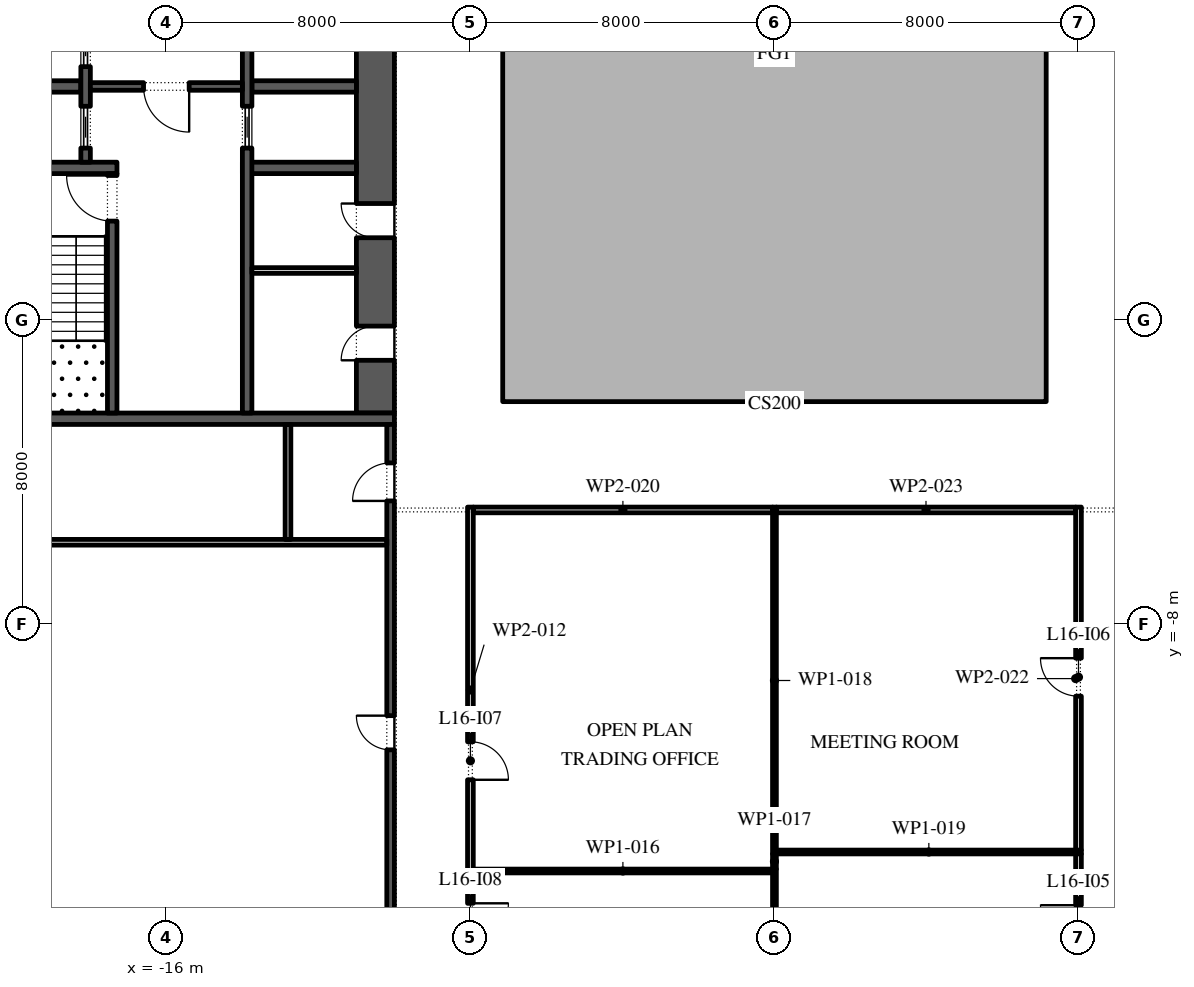
"""IFC4 building model, lengths in metres.
Left out: names, types, materials, properties, quantities, classifications, styles, units other than length and angle.
Written with IfcOpenShell. Run it as: python <this file> out.ifc"""

import sys

from ifc_helpers import new_model, si_unit, direction, frame, frame_2d, origin, place, context, subcontext, project, spatial, polyline, rectangle, outline, extrude, element, fill, save


model = new_model("IFC4")
c1 = context("Model", 3, precision=1e-05, world=origin(), true_north=direction((0.0, 1.0)))
c2 = subcontext(c1, "Body", "Model", "MODEL_VIEW")
j1 = project(units=[si_unit("LENGTHUNIT", "METRE"), si_unit("PLANEANGLEUNIT", "RADIAN")], contexts=[c1])
p1 = place(None, origin())
s1 = spatial("IfcSite", under=j1, at=p1, CompositionType="ELEMENT")
p2 = place(p1, origin())
s2 = spatial("IfcBuilding", under=s1, at=p2, CompositionType="ELEMENT")
p3 = place(p2, frame((0.0, 0.0, 77.4)))
s3 = spatial("IfcBuildingStorey", under=s2, at=p3, CompositionType="ELEMENT", Elevation=77.4)
p4 = place(p3, origin())
e1 = element("IfcWall", 1, at=p4, inside=s3, PredefinedType="STANDARD", context=c2, shape_type="SweptSolid", body=[
    extrude(outline(polyline([(-7.15, -2.15), (7.15, -2.15), (7.15, 16.15), (-7.15, 16.15), (-7.15, -2.15)]), holes=[polyline([(-7.0, -2.0), (-7.0, 16.0), (7.0, 16.0), (7.0, -2.0), (-7.0, -2.0)])]), origin(), (0.0, 0.0, 1.0), 4.0),
])
p5 = place(p3, frame((-10.5, -2.45, 0.0), z_axis=(0.0, 0.0, 1.0), x_axis=(0.0, 1.0, 0.0)))
e2 = element("IfcWall", 2, at=p5, inside=s3, PredefinedType="SHEAR", context=c2, shape_type="SweptSolid", body=[
    extrude(rectangle(XDim=27.9, YDim=1.0, at=frame_2d((13.95, 0.0))), origin(), (0.0, 0.0, 1.0), 4.0),
])
p6 = place(p5, frame((23.65, 0.0, 0.0)))
e3 = element("IfcOpeningElement", 3, at=p6, cuts=e2, PredefinedType="OPENING", context=c2, shape_type="SweptSolid", body=[
    extrude(rectangle(XDim=2.4, YDim=2.1, at=frame_2d((1.2, 1.05))), frame((0.0, 0.51, 0.0), z_axis=(0.0, -1.0, 0.0), x_axis=(1.0, 0.0, 0.0)), (0.0, 0.0, 1.0), 1.02),
])
p7 = place(p5, frame((1.387, 0.0, 0.0)))
e4 = element("IfcOpeningElement", 4, at=p7, cuts=e2, PredefinedType="OPENING", context=c2, shape_type="SweptSolid", body=[
    extrude(rectangle(XDim=0.9, YDim=2.1, at=frame_2d((0.45, 1.05))), frame((0.0, 0.51, 0.0), z_axis=(0.0, -1.0, 0.0), x_axis=(1.0, 0.0, 0.0)), (0.0, 0.0, 1.0), 1.02),
])
p8 = place(p5, frame((4.613, 0.0, 0.0)))
e5 = element("IfcOpeningElement", 5, at=p8, cuts=e2, PredefinedType="OPENING", context=c2, shape_type="SweptSolid", body=[
    extrude(rectangle(XDim=0.9, YDim=2.1, at=frame_2d((0.45, 1.05))), frame((0.0, 0.51, 0.0), z_axis=(0.0, -1.0, 0.0), x_axis=(1.0, 0.0, 0.0)), (0.0, 0.0, 1.0), 1.02),
])
p9 = place(p3, frame((-22.0, -2.6, 0.0), z_axis=(0.0, 0.0, 1.0), x_axis=(1.0, 0.0, 0.0)))
e6 = element("IfcWall", 6, at=p9, inside=s3, PredefinedType="SHEAR", context=c2, shape_type="SweptSolid", body=[
    extrude(rectangle(XDim=12.0, YDim=0.3, at=frame_2d((6.0, 0.0))), origin(), (0.0, 0.0, 1.0), 4.0),
])
p10 = place(p3, frame((-21.0, 4.0, 0.0), z_axis=(0.0, 0.0, 1.0), x_axis=(1.0, 0.0, 0.0)))
e7 = element("IfcWall", 7, at=p10, inside=s3, PredefinedType="SHEAR", context=c2, shape_type="SweptSolid", body=[
    extrude(rectangle(XDim=3.7, YDim=0.3, at=frame_2d((1.85, 0.0))), origin(), (0.0, 0.0, 1.0), 4.0),
])
p11 = place(p3, frame((-17.425, -2.45, 0.0), z_axis=(0.0, 0.0, 1.0), x_axis=(0.0, 1.0, 0.0)))
e8 = element("IfcWall", 8, at=p11, inside=s3, PredefinedType="SHEAR", context=c2, shape_type="SweptSolid", body=[
    extrude(rectangle(XDim=6.3, YDim=0.25, at=frame_2d((3.15, 0.0))), origin(), (0.0, 0.0, 1.0), 4.0),
])
p12 = place(p11, frame((5.05, 0.0, 0.0)))
e9 = element("IfcOpeningElement", 9, at=p12, cuts=e8, PredefinedType="OPENING", context=c2, shape_type="SweptSolid", body=[
    extrude(rectangle(XDim=1.2, YDim=2.1, at=frame_2d((0.6, 1.05))), frame((0.0, 0.135, 0.0), z_axis=(0.0, -1.0, 0.0), x_axis=(1.0, 0.0, 0.0)), (0.0, 0.0, 1.0), 0.27),
])
p13 = place(p3, frame((-21.0, 6.143, 0.0), z_axis=(0.0, 0.0, 1.0), x_axis=(1.0, 0.0, 0.0)))
e10 = element("IfcWall", 10, at=p13, inside=s3, PredefinedType="SHEAR", context=c2, shape_type="SweptSolid", body=[
    extrude(rectangle(XDim=2.75, YDim=0.3, at=frame_2d((1.375, 0.0))), origin(), (0.0, 0.0, 1.0), 4.0),
])
p14 = place(p3, frame((-18.125, 4.15, 0.0), z_axis=(0.0, 0.0, 1.0), x_axis=(0.0, 1.0, 0.0)))
e11 = element("IfcWall", 11, at=p14, inside=s3, PredefinedType="SHEAR", context=c2, shape_type="SweptSolid", body=[
    extrude(rectangle(XDim=14.7, YDim=0.25, at=frame_2d((7.35, 0.0))), origin(), (0.0, 0.0, 1.0), 4.0),
])
p15 = place(p14, frame((0.371, 0.0, 0.0)))
e12 = element("IfcOpeningElement", 12, at=p15, cuts=e11, PredefinedType="OPENING", context=c2, shape_type="SweptSolid", body=[
    extrude(rectangle(XDim=1.1, YDim=2.1, at=frame_2d((0.55, 1.05))), frame((0.0, 0.135, 0.0), z_axis=(0.0, -1.0, 0.0), x_axis=(1.0, 0.0, 0.0)), (0.0, 0.0, 1.0), 0.27),
])
p16 = place(p14, frame((2.514, 0.0, 0.0)))
e13 = element("IfcOpeningElement", 13, at=p16, cuts=e11, PredefinedType="OPENING", context=c2, shape_type="SweptSolid", body=[
    extrude(rectangle(XDim=1.1, YDim=2.1, at=frame_2d((0.55, 1.05))), frame((0.0, 0.135, 0.0), z_axis=(0.0, -1.0, 0.0), x_axis=(1.0, 0.0, 0.0)), (0.0, 0.0, 1.0), 0.27),
])
p17 = place(p14, frame((4.657, 0.0, 0.0)))
e14 = element("IfcOpeningElement", 14, at=p17, cuts=e11, PredefinedType="OPENING", context=c2, shape_type="SweptSolid", body=[
    extrude(rectangle(XDim=1.1, YDim=2.1, at=frame_2d((0.55, 1.05))), frame((0.0, 0.135, 0.0), z_axis=(0.0, -1.0, 0.0), x_axis=(1.0, 0.0, 0.0)), (0.0, 0.0, 1.0), 0.27),
])
p18 = place(p14, frame((6.8, 0.0, 0.0)))
e15 = element("IfcOpeningElement", 15, at=p18, cuts=e11, PredefinedType="OPENING", context=c2, shape_type="SweptSolid", body=[
    extrude(rectangle(XDim=1.1, YDim=2.1, at=frame_2d((0.55, 1.05))), frame((0.0, 0.135, 0.0), z_axis=(0.0, -1.0, 0.0), x_axis=(1.0, 0.0, 0.0)), (0.0, 0.0, 1.0), 0.27),
])
p19 = place(p14, frame((8.943, 0.0, 0.0)))
e16 = element("IfcOpeningElement", 16, at=p19, cuts=e11, PredefinedType="OPENING", context=c2, shape_type="SweptSolid", body=[
    extrude(rectangle(XDim=1.1, YDim=2.1, at=frame_2d((0.55, 1.05))), frame((0.0, 0.135, 0.0), z_axis=(0.0, -1.0, 0.0), x_axis=(1.0, 0.0, 0.0)), (0.0, 0.0, 1.0), 0.27),
])
p20 = place(p14, frame((11.086, 0.0, 0.0)))
e17 = element("IfcOpeningElement", 17, at=p20, cuts=e11, PredefinedType="OPENING", context=c2, shape_type="SweptSolid", body=[
    extrude(rectangle(XDim=1.1, YDim=2.1, at=frame_2d((0.55, 1.05))), frame((0.0, 0.135, 0.0), z_axis=(0.0, -1.0, 0.0), x_axis=(1.0, 0.0, 0.0)), (0.0, 0.0, 1.0), 0.27),
])
p21 = place(p14, frame((13.229, 0.0, 0.0)))
e18 = element("IfcOpeningElement", 18, at=p21, cuts=e11, PredefinedType="OPENING", context=c2, shape_type="SweptSolid", body=[
    extrude(rectangle(XDim=1.1, YDim=2.1, at=frame_2d((0.55, 1.05))), frame((0.0, 0.135, 0.0), z_axis=(0.0, -1.0, 0.0), x_axis=(1.0, 0.0, 0.0)), (0.0, 0.0, 1.0), 0.27),
])
p22 = place(p3, frame((-14.0, 4.0, 0.0), z_axis=(0.0, 0.0, 1.0), x_axis=(1.0, 0.0, 0.0)))
e19 = element("IfcWall", 19, at=p22, inside=s3, PredefinedType="SHEAR", context=c2, shape_type="SweptSolid", body=[
    extrude(rectangle(XDim=3.0, YDim=0.3, at=frame_2d((1.5, 0.0))), origin(), (0.0, 0.0, 1.0), 4.0),
])
p23 = place(p3, frame((-13.75, 6.143, 0.0), z_axis=(0.0, 0.0, 1.0), x_axis=(1.0, 0.0, 0.0)))
e20 = element("IfcWall", 20, at=p23, inside=s3, PredefinedType="SHEAR", context=c2, shape_type="SweptSolid", body=[
    extrude(rectangle(XDim=2.75, YDim=0.3, at=frame_2d((1.375, 0.0))), origin(), (0.0, 0.0, 1.0), 4.0),
])
p24 = place(p3, frame((-13.875, -2.45, 0.0), z_axis=(0.0, 0.0, 1.0), x_axis=(0.0, 1.0, 0.0)))
e21 = element("IfcWall", 21, at=p24, inside=s3, PredefinedType="SHEAR", context=c2, shape_type="SweptSolid", body=[
    extrude(rectangle(XDim=21.3, YDim=0.25, at=frame_2d((10.65, 0.0))), origin(), (0.0, 0.0, 1.0), 4.0),
])
p25 = place(p24, frame((11.446, 0.0, 0.0)))
e22 = element("IfcOpeningElement", 22, at=p25, cuts=e21, PredefinedType="OPENING", context=c2, shape_type="SweptSolid", body=[
    extrude(rectangle(XDim=0.9, YDim=2.1, at=frame_2d((0.45, 1.05))), frame((0.0, 0.135, 0.0), z_axis=(0.0, -1.0, 0.0), x_axis=(1.0, 0.0, 0.0)), (0.0, 0.0, 1.0), 0.27),
])
p26 = place(p24, frame((17.725, 0.0, 0.0)))
e23 = element("IfcOpeningElement", 23, at=p26, cuts=e21, PredefinedType="OPENING", context=c2, shape_type="SweptSolid", body=[
    extrude(rectangle(XDim=0.9, YDim=2.1, at=frame_2d((0.45, 1.05))), frame((0.0, 0.135, 0.0), z_axis=(0.0, -1.0, 0.0), x_axis=(1.0, 0.0, 0.0)), (0.0, 0.0, 1.0), 0.27),
])
p27 = place(p24, frame((6.971, 0.0, 0.0)))
e24 = element("IfcOpeningElement", 24, at=p27, cuts=e21, PredefinedType="OPENING", context=c2, shape_type="SweptSolid", body=[
    extrude(rectangle(XDim=1.1, YDim=2.1, at=frame_2d((0.55, 1.05))), frame((0.0, 0.135, 0.0), z_axis=(0.0, -1.0, 0.0), x_axis=(1.0, 0.0, 0.0)), (0.0, 0.0, 1.0), 0.27),
])
p28 = place(p3, frame((-18.0, 6.143, 0.0), z_axis=(0.0, 0.0, 1.0), x_axis=(1.0, 0.0, 0.0)))
e25 = element("IfcWall", 25, at=p28, inside=s3, PredefinedType="SHEAR", context=c2, shape_type="SweptSolid", body=[
    extrude(rectangle(XDim=4.0, YDim=0.2, at=frame_2d((2.0, 0.0))), origin(), (0.0, 0.0, 1.0), 4.0),
])
p29 = place(p28, frame((1.4, 0.0, 0.0)))
e26 = element("IfcOpeningElement", 26, at=p29, cuts=e25, PredefinedType="OPENING", context=c2, shape_type="SweptSolid", body=[
    extrude(rectangle(XDim=1.2, YDim=2.1, at=frame_2d((0.6, 1.05))), frame((0.0, 0.11, 0.0), z_axis=(0.0, -1.0, 0.0), x_axis=(1.0, 0.0, 0.0)), (0.0, 0.0, 1.0), 0.22),
])
p30 = place(p3, frame((-13.75, 1.3, 0.0), z_axis=(0.0, 0.0, 1.0), x_axis=(1.0, 0.0, 0.0)))
e27 = element("IfcWall", 27, at=p30, inside=s3, PredefinedType="PARTITIONING", context=c2, shape_type="SweptSolid", body=[
    extrude(rectangle(XDim=2.75, YDim=0.15, at=frame_2d((1.375, 0.0))), origin(), (0.0, 0.0, 1.0), 4.0),
])
p31 = place(p3, frame((-10.1, -15.8, 0.0), z_axis=(0.0, 0.0, 1.0), x_axis=(0.0, 1.0, 0.0)))
e28 = element("IfcWall", 28, at=p31, inside=s3, PredefinedType="SHEAR", context=c2, shape_type="SweptSolid", body=[
    extrude(rectangle(XDim=13.05, YDim=0.2, at=frame_2d((6.525, 0.0))), origin(), (0.0, 0.0, 1.0), 4.0),
])
p32 = place(p31, frame((4.488, 0.0, 0.0)))
e29 = element("IfcOpeningElement", 29, at=p32, cuts=e28, PredefinedType="OPENING", context=c2, shape_type="SweptSolid", body=[
    extrude(rectangle(XDim=0.9, YDim=2.1, at=frame_2d((0.45, 1.05))), frame((0.0, 0.11, 0.0), z_axis=(0.0, -1.0, 0.0), x_axis=(1.0, 0.0, 0.0)), (0.0, 0.0, 1.0), 0.22),
])
p33 = place(p31, frame((11.038, 0.0, 0.0)))
e30 = element("IfcOpeningElement", 30, at=p33, cuts=e28, PredefinedType="OPENING", context=c2, shape_type="SweptSolid", body=[
    extrude(rectangle(XDim=1.0, YDim=2.1, at=frame_2d((0.5, 1.05))), frame((0.0, 0.11, 0.0), z_axis=(0.0, -1.0, 0.0), x_axis=(1.0, 0.0, 0.0)), (0.0, 0.0, 1.0), 0.22),
])
p34 = place(p3, frame((-21.8, -5.85, 0.0), z_axis=(0.0, 0.0, 1.0), x_axis=(1.0, 0.0, 0.0)))
e31 = element("IfcWall", 31, at=p34, inside=s3, PredefinedType="PARTITIONING", context=c2, shape_type="SweptSolid", body=[
    extrude(rectangle(XDim=11.6, YDim=0.15, at=frame_2d((5.8, 0.0))), origin(), (0.0, 0.0, 1.0), 4.0),
])
p35 = place(p3, frame((-12.8, -5.775, 0.0), z_axis=(0.0, 0.0, 1.0), x_axis=(0.0, 1.0, 0.0)))
e32 = element("IfcWall", 32, at=p35, inside=s3, PredefinedType="PARTITIONING", context=c2, shape_type="SweptSolid", body=[
    extrude(rectangle(XDim=3.025, YDim=0.15, at=frame_2d((1.512, 0.0))), origin(), (0.0, 0.0, 1.0), 4.0),
])
p36 = place(p3, frame((-8.0, -14.55, 0.0), z_axis=(0.0, 0.0, 1.0), x_axis=(0.0, -1.0, 0.0)))
e33 = element("IfcWall", 33, at=p36, inside=s3, PredefinedType="PARTITIONING", context=c2, shape_type="SweptSolid", body=[
    extrude(rectangle(XDim=3.375, YDim=0.15, at=frame_2d((1.688, 0.0))), origin(), (0.0, 0.0, 1.0), 4.0),
])
p37 = place(p36, frame((0.8, 0.0, 0.0)))
e34 = element("IfcOpeningElement", 34, at=p37, cuts=e33, PredefinedType="OPENING", context=c2, shape_type="SweptSolid", body=[
    extrude(rectangle(XDim=1.0, YDim=2.1, at=frame_2d((0.5, 1.05))), frame((0.0, 0.085, 0.0), z_axis=(0.0, -1.0, 0.0), x_axis=(1.0, 0.0, 0.0)), (0.0, 0.0, 1.0), 0.17),
])
p38 = place(p3, frame((-8.0, -4.925, 0.0), z_axis=(0.0, 0.0, 1.0), x_axis=(0.0, -1.0, 0.0)))
e35 = element("IfcWall", 35, at=p38, inside=s3, PredefinedType="PARTITIONING", context=c2, shape_type="SweptSolid", body=[
    extrude(rectangle(XDim=9.625, YDim=0.15, at=frame_2d((4.812, 0.0))), origin(), (0.0, 0.0, 1.0), 4.0),
])
p39 = place(p38, frame((6.175, 0.0, 0.0)))
e36 = element("IfcOpeningElement", 36, at=p39, cuts=e35, PredefinedType="OPENING", context=c2, shape_type="SweptSolid", body=[
    extrude(rectangle(XDim=1.0, YDim=2.1, at=frame_2d((0.5, 1.05))), frame((0.0, 0.085, 0.0), z_axis=(0.0, -1.0, 0.0), x_axis=(1.0, 0.0, 0.0)), (0.0, 0.0, 1.0), 0.17),
])
p40 = place(p3, frame((0.0, -27.8, 0.0), z_axis=(0.0, 0.0, 1.0), x_axis=(0.0, 1.0, 0.0)))
e37 = element("IfcWall", 37, at=p40, inside=s3, PredefinedType="PARTITIONING", context=c2, shape_type="SweptSolid", body=[
    extrude(rectangle(XDim=13.35, YDim=0.1, at=frame_2d((6.675, 0.0))), origin(), (0.0, 0.0, 1.0), 4.0),
])
p41 = place(p3, frame((-0.05, -14.5, 0.0), z_axis=(0.0, 0.0, 1.0), x_axis=(-1.0, 0.0, 0.0)))
e38 = element("IfcWall", 38, at=p41, inside=s3, PredefinedType="PARTITIONING", context=c2, shape_type="SweptSolid", body=[
    extrude(rectangle(XDim=7.875, YDim=0.1, at=frame_2d((3.938, 0.0))), origin(), (0.0, 0.0, 1.0), 4.0),
])
p42 = place(p3, frame((0.0, -14.45, 0.0), z_axis=(0.0, 0.0, 1.0), x_axis=(0.0, 1.0, 0.0)))
e39 = element("IfcWall", 39, at=p42, inside=s3, PredefinedType="PARTITIONING", context=c2, shape_type="SweptSolid", body=[
    extrude(rectangle(XDim=0.4, YDim=0.1, at=frame_2d((0.2, 0.0))), origin(), (0.0, 0.0, 1.0), 4.0),
])
p43 = place(p3, frame((0.0, -14.05, 0.0), z_axis=(0.0, 0.0, 1.0), x_axis=(0.0, 1.0, 0.0)))
e40 = element("IfcWall", 40, at=p43, inside=s3, PredefinedType="PARTITIONING", context=c2, shape_type="SweptSolid", body=[
    extrude(rectangle(XDim=9.125, YDim=0.1, at=frame_2d((4.562, 0.0))), origin(), (0.0, 0.0, 1.0), 4.0),
])
p44 = place(p3, frame((0.05, -14.0, 0.0), z_axis=(0.0, 0.0, 1.0), x_axis=(1.0, 0.0, 0.0)))
e41 = element("IfcWall", 41, at=p44, inside=s3, PredefinedType="PARTITIONING", context=c2, shape_type="SweptSolid", body=[
    extrude(rectangle(XDim=8.025, YDim=0.1, at=frame_2d((4.012, 0.0))), origin(), (0.0, 0.0, 1.0), 4.0),
])
p45 = place(p3, frame((-0.05, -5.0, 0.0), z_axis=(0.0, 0.0, 1.0), x_axis=(-1.0, 0.0, 0.0)))
e42 = element("IfcWall", 42, at=p45, inside=s3, PredefinedType="PARTITIONING", context=c2, shape_type="SweptSolid", body=[
    extrude(rectangle(XDim=7.875, YDim=0.15, at=frame_2d((3.938, 0.0))), origin(), (0.0, 0.0, 1.0), 4.0),
])
p46 = place(p3, frame((8.0, -18.075, 0.0), z_axis=(0.0, 0.0, 1.0), x_axis=(0.0, 1.0, 0.0)))
e43 = element("IfcWall", 43, at=p46, inside=s3, PredefinedType="PARTITIONING", context=c2, shape_type="SweptSolid", body=[
    extrude(rectangle(XDim=4.025, YDim=0.15, at=frame_2d((2.012, 0.0))), origin(), (0.0, 0.0, 1.0), 4.0),
])
p47 = place(p46, frame((1.675, 0.0, 0.0)))
e44 = element("IfcOpeningElement", 44, at=p47, cuts=e43, PredefinedType="OPENING", context=c2, shape_type="SweptSolid", body=[
    extrude(rectangle(XDim=1.0, YDim=2.1, at=frame_2d((0.5, 1.05))), frame((0.0, 0.085, 0.0), z_axis=(0.0, -1.0, 0.0), x_axis=(1.0, 0.0, 0.0)), (0.0, 0.0, 1.0), 0.17),
])
p48 = place(p3, frame((8.0, -13.95, 0.0), z_axis=(0.0, 0.0, 1.0), x_axis=(0.0, 1.0, 0.0)))
e45 = element("IfcWall", 45, at=p48, inside=s3, PredefinedType="PARTITIONING", context=c2, shape_type="SweptSolid", body=[
    extrude(rectangle(XDim=9.025, YDim=0.15, at=frame_2d((4.512, 0.0))), origin(), (0.0, 0.0, 1.0), 4.0),
])
p49 = place(p48, frame((4.05, 0.0, 0.0)))
e46 = element("IfcOpeningElement", 46, at=p49, cuts=e45, PredefinedType="OPENING", context=c2, shape_type="SweptSolid", body=[
    extrude(rectangle(XDim=1.0, YDim=2.1, at=frame_2d((0.5, 1.05))), frame((0.0, 0.085, 0.0), z_axis=(0.0, -1.0, 0.0), x_axis=(1.0, 0.0, 0.0)), (0.0, 0.0, 1.0), 0.17),
])
p50 = place(p3, frame((7.925, -5.0, 0.0), z_axis=(0.0, 0.0, 1.0), x_axis=(-1.0, 0.0, 0.0)))
e47 = element("IfcWall", 47, at=p50, inside=s3, PredefinedType="PARTITIONING", context=c2, shape_type="SweptSolid", body=[
    extrude(rectangle(XDim=7.875, YDim=0.15, at=frame_2d((3.938, 0.0))), origin(), (0.0, 0.0, 1.0), 4.0),
])
p51 = place(p15, origin())
e48 = element("IfcDoor", 48, at=p51, inside=s3, OperationType="SLIDING_TO_LEFT", PredefinedType="DOOR", context=c2, shape_type="SweptSolid", body=[
    extrude(rectangle(XDim=1.1, YDim=2.1, at=frame_2d((0.55, 1.05))), frame((0.0, 0.025, 0.0), z_axis=(0.0, -1.0, 0.0), x_axis=(1.0, 0.0, 0.0)), (0.0, 0.0, 1.0), 0.05),
])
fill(e12, e48)
p52 = place(p16, origin())
e49 = element("IfcDoor", 49, at=p52, inside=s3, OperationType="SLIDING_TO_LEFT", PredefinedType="DOOR", context=c2, shape_type="SweptSolid", body=[
    extrude(rectangle(XDim=1.1, YDim=2.1, at=frame_2d((0.55, 1.05))), frame((0.0, 0.025, 0.0), z_axis=(0.0, -1.0, 0.0), x_axis=(1.0, 0.0, 0.0)), (0.0, 0.0, 1.0), 0.05),
])
fill(e13, e49)
p53 = place(p27, origin())
e50 = element("IfcDoor", 50, at=p53, inside=s3, OperationType="SLIDING_TO_LEFT", PredefinedType="DOOR", context=c2, shape_type="SweptSolid", body=[
    extrude(rectangle(XDim=1.1, YDim=2.1, at=frame_2d((0.55, 1.05))), frame((0.0, 0.025, 0.0), z_axis=(0.0, -1.0, 0.0), x_axis=(1.0, 0.0, 0.0)), (0.0, 0.0, 1.0), 0.05),
])
fill(e24, e50)
p54 = place(p29, frame((1.2, 0.0, 0.0), z_axis=(0.0, 0.0, 1.0), x_axis=(-1.0, 0.0, 0.0)))
e51 = element("IfcDoor", 51, at=p54, inside=s3, OperationType="SINGLE_SWING_RIGHT", PredefinedType="DOOR", context=c2, shape_type="SweptSolid", body=[
    extrude(rectangle(XDim=1.2, YDim=2.1, at=frame_2d((0.6, 1.05))), frame((0.0, 0.025, 0.0), z_axis=(0.0, -1.0, 0.0), x_axis=(1.0, 0.0, 0.0)), (0.0, 0.0, 1.0), 0.05),
])
fill(e26, e51)
p55 = place(p12, origin())
e52 = element("IfcDoor", 52, at=p55, inside=s3, OperationType="SINGLE_SWING_LEFT", PredefinedType="DOOR", context=c2, shape_type="SweptSolid", body=[
    extrude(rectangle(XDim=1.2, YDim=2.1, at=frame_2d((0.6, 1.05))), frame((0.0, 0.025, 0.0), z_axis=(0.0, -1.0, 0.0), x_axis=(1.0, 0.0, 0.0)), (0.0, 0.0, 1.0), 0.05),
])
fill(e9, e52)
p56 = place(p7, origin())
e53 = element("IfcDoor", 53, at=p56, inside=s3, OperationType="SINGLE_SWING_RIGHT", PredefinedType="DOOR", context=c2, shape_type="SweptSolid", body=[
    extrude(rectangle(XDim=0.9, YDim=2.1, at=frame_2d((0.45, 1.05))), frame((0.0, 0.5, 0.0), z_axis=(0.0, -1.0, 0.0), x_axis=(1.0, 0.0, 0.0)), (0.0, 0.0, 1.0), 0.05),
])
fill(e4, e53)
p57 = place(p8, origin())
e54 = element("IfcDoor", 54, at=p57, inside=s3, OperationType="SINGLE_SWING_LEFT", PredefinedType="DOOR", context=c2, shape_type="SweptSolid", body=[
    extrude(rectangle(XDim=0.9, YDim=2.1, at=frame_2d((0.45, 1.05))), frame((0.0, 0.5, 0.0), z_axis=(0.0, -1.0, 0.0), x_axis=(1.0, 0.0, 0.0)), (0.0, 0.0, 1.0), 0.05),
])
fill(e5, e54)
p58 = place(p32, origin())
e55 = element("IfcDoor", 55, at=p58, inside=s3, OperationType="SINGLE_SWING_LEFT", PredefinedType="DOOR", context=c2, shape_type="SweptSolid", body=[
    extrude(rectangle(XDim=0.9, YDim=2.1, at=frame_2d((0.45, 1.05))), frame((0.0, 0.1, 0.0), z_axis=(0.0, -1.0, 0.0), x_axis=(1.0, 0.0, 0.0)), (0.0, 0.0, 1.0), 0.05),
])
fill(e29, e55)
p59 = place(p33, origin())
e56 = element("IfcDoor", 56, at=p59, inside=s3, OperationType="SINGLE_SWING_RIGHT", PredefinedType="DOOR", context=c2, shape_type="SweptSolid", body=[
    extrude(rectangle(XDim=1.0, YDim=2.1, at=frame_2d((0.5, 1.05))), frame((0.0, 0.1, 0.0), z_axis=(0.0, -1.0, 0.0), x_axis=(1.0, 0.0, 0.0)), (0.0, 0.0, 1.0), 0.05),
])
fill(e30, e56)
p60 = place(p47, origin())
e57 = element("IfcDoor", 57, at=p60, inside=s3, OperationType="SINGLE_SWING_LEFT", PredefinedType="DOOR", context=c2, shape_type="SweptSolid", body=[
    extrude(rectangle(XDim=1.0, YDim=2.1, at=frame_2d((0.5, 1.05))), frame((0.0, 0.025, 0.0), z_axis=(0.0, -1.0, 0.0), x_axis=(1.0, 0.0, 0.0)), (0.0, 0.0, 1.0), 0.05),
])
fill(e44, e57)
p61 = place(p49, origin())
e58 = element("IfcDoor", 58, at=p61, inside=s3, OperationType="SINGLE_SWING_LEFT", PredefinedType="DOOR", context=c2, shape_type="SweptSolid", body=[
    extrude(rectangle(XDim=1.0, YDim=2.1, at=frame_2d((0.5, 1.05))), frame((0.0, 0.025, 0.0), z_axis=(0.0, -1.0, 0.0), x_axis=(1.0, 0.0, 0.0)), (0.0, 0.0, 1.0), 0.05),
])
fill(e46, e58)
p62 = place(p39, origin())
e59 = element("IfcDoor", 59, at=p62, inside=s3, OperationType="SINGLE_SWING_LEFT", PredefinedType="DOOR", context=c2, shape_type="SweptSolid", body=[
    extrude(rectangle(XDim=1.0, YDim=2.1, at=frame_2d((0.5, 1.05))), frame((0.0, 0.025, 0.0), z_axis=(0.0, -1.0, 0.0), x_axis=(1.0, 0.0, 0.0)), (0.0, 0.0, 1.0), 0.05),
])
fill(e36, e59)
p63 = place(p37, origin())
e60 = element("IfcDoor", 60, at=p63, inside=s3, OperationType="SINGLE_SWING_RIGHT", PredefinedType="DOOR", context=c2, shape_type="SweptSolid", body=[
    extrude(rectangle(XDim=1.0, YDim=2.1, at=frame_2d((0.5, 1.05))), frame((0.0, 0.025, 0.0), z_axis=(0.0, -1.0, 0.0), x_axis=(1.0, 0.0, 0.0)), (0.0, 0.0, 1.0), 0.05),
])
fill(e34, e60)
save(model, sys.argv[1])
